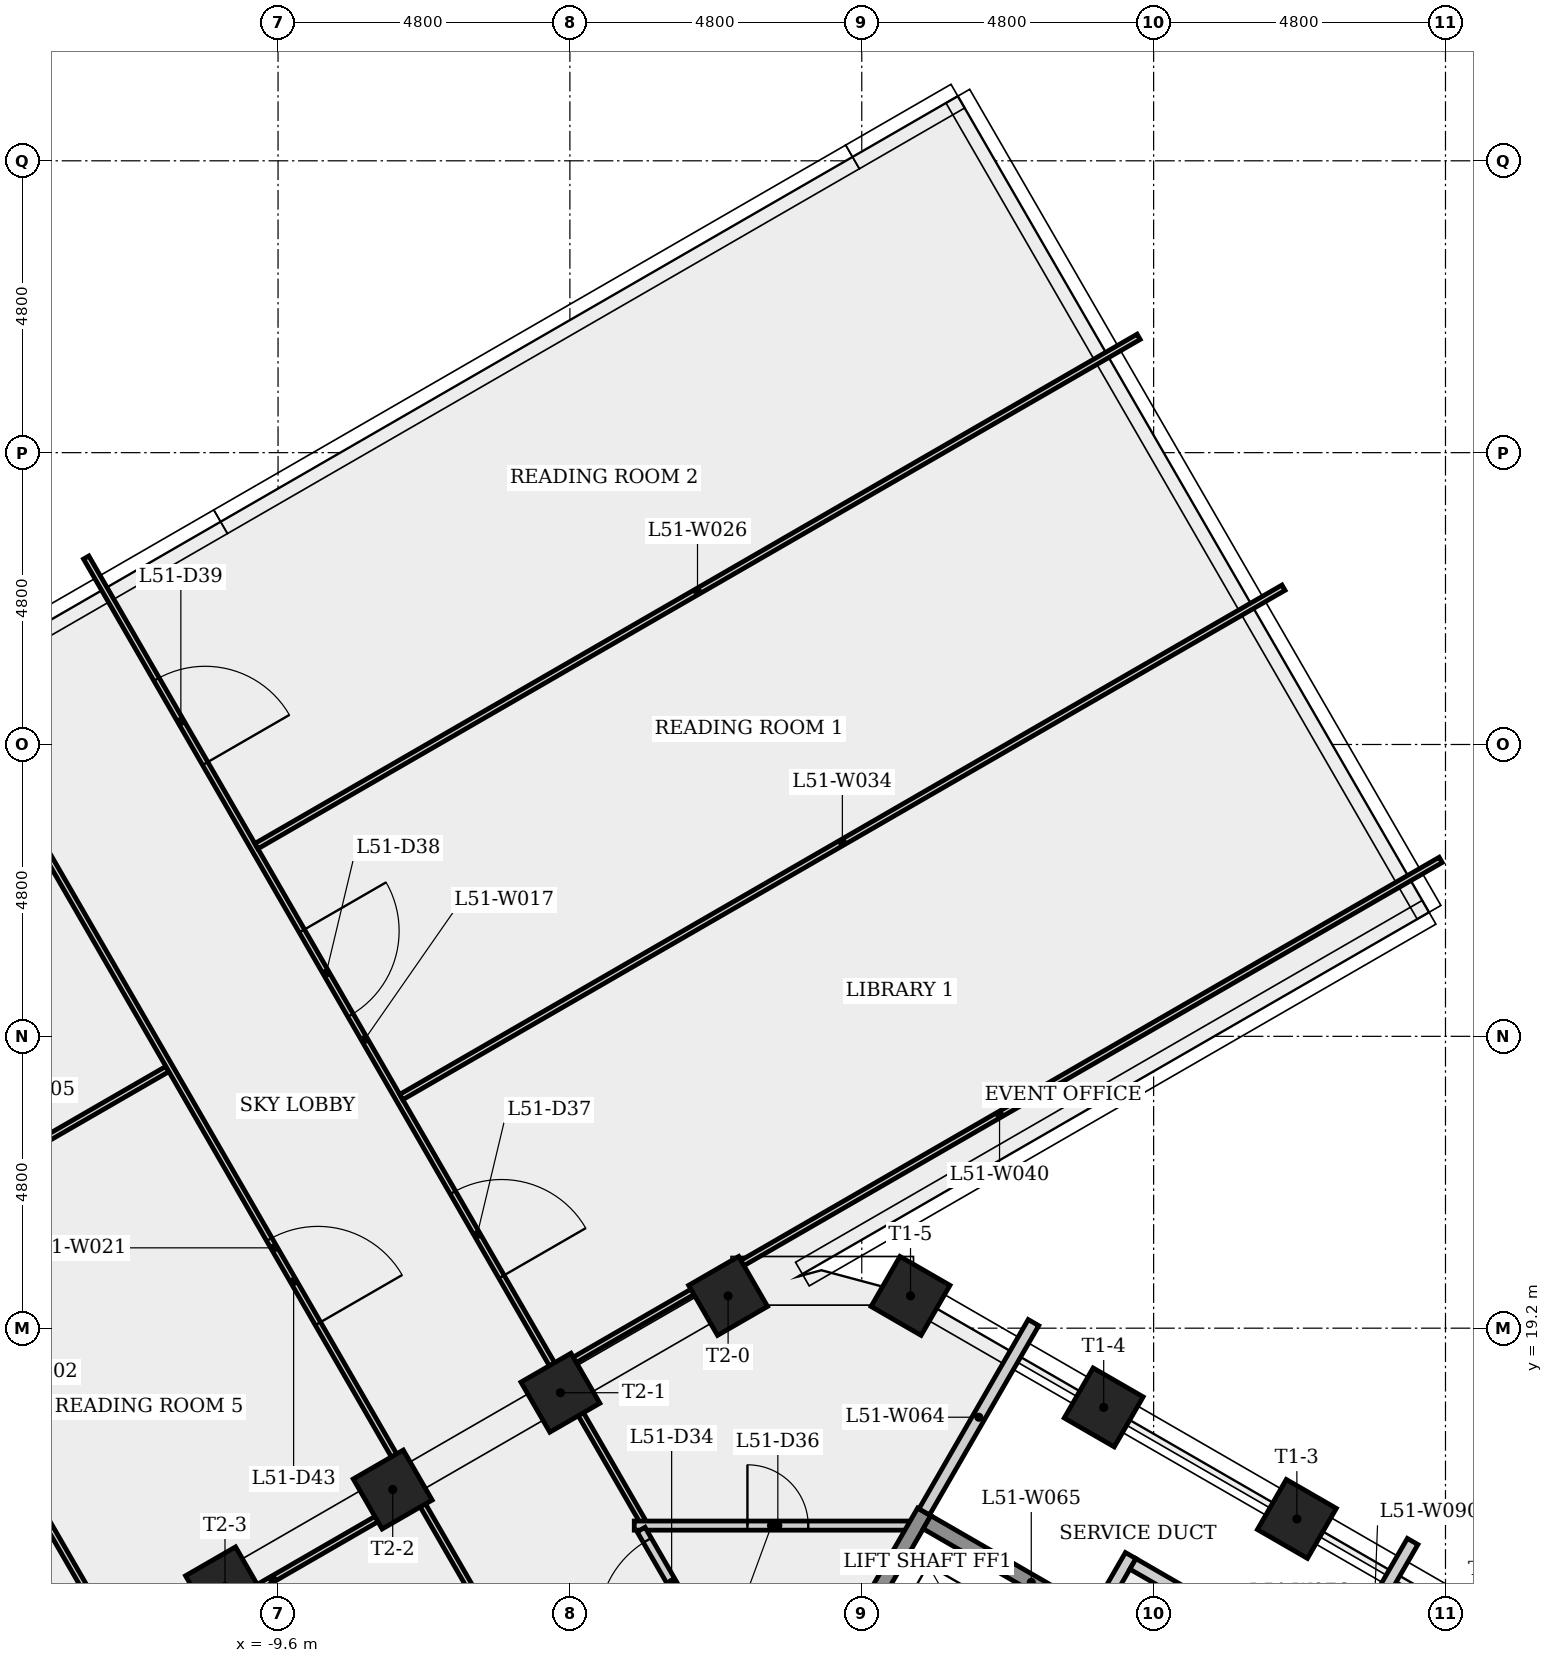
"""IFC4 building model, lengths in metres.
Left out: names, types, materials, properties, quantities, classifications, styles, units other than length and angle.
Written with IfcOpenShell. Run it as: python <this file> out.ifc"""

import sys

from ifc_helpers import new_model, si_unit, direction, frame, frame_2d, origin, origin_2d, place, context, subcontext, project, spatial, rectangle, extrude, element, fill, save


model = new_model("IFC4")
c1 = context("Model", 3, precision=1e-05, world=origin(), true_north=direction((0.0, 1.0)))
c2 = subcontext(c1, "Body", "Model", "MODEL_VIEW")
j1 = project(units=[si_unit("LENGTHUNIT", "METRE"), si_unit("PLANEANGLEUNIT", "RADIAN")], contexts=[c1])
p1 = place(None, origin())
s1 = spatial("IfcSite", under=j1, at=p1, CompositionType="ELEMENT")
p2 = place(p1, origin())
s2 = spatial("IfcBuilding", under=s1, at=p2, CompositionType="ELEMENT")
p3 = place(p2, frame((0.0, 0.0, 190.7)))
s3 = spatial("IfcBuildingStorey", under=s2, at=p3, CompositionType="ELEMENT", Elevation=190.7)
for number, where, z_axis, x_axis in (
    (1, (7.156, 16.062, 0.0), (0.0, 0.0, 1.0), (0.5, 0.866, 0.0)),
    (2, (3.979, 17.897, 0.0), (0.0, 0.0, 1.0), (0.5, 0.866, 0.0)),
    (3, (0.802, 19.731, 0.0), (0.0, 0.0, 1.0), (0.5, 0.866, 0.0)),
    (4, (-2.198, 19.731, 0.0), (0.0, 0.0, 1.0), (-0.5, 0.866, 0.0)),
    (5, (-4.956, 18.138, 0.0), (0.0, 0.0, 1.0), (-0.5, 0.866, 0.0)),
    (6, (-7.714, 16.546, 0.0), (0.0, 0.0, 1.0), (-0.5, 0.866, 0.0)),
    (7, (-10.472, 14.954, 0.0), (0.0, 0.0, 1.0), (-0.5, 0.866, 0.0)),
):
    element("IfcColumn", number, at=place(p3, frame(where, z_axis=z_axis, x_axis=x_axis)), inside=s3, PredefinedType="COLUMN", context=c2, shape_type="SweptSolid", body=[
        extrude(rectangle(XDim=0.95, YDim=0.95, at=origin_2d()), origin(), (0.0, 0.0, 1.0), 4.0),
    ])
p4 = place(p3, frame((-20.11, 27.629, 0.0), z_axis=(0.0, 0.0, 1.0), x_axis=(0.499998569178, -0.866026229868, 0.0)))
e8 = element("IfcWall", 8, at=p4, inside=s3, PredefinedType="PARTITIONING", context=c2, shape_type="SweptSolid", body=[
    extrude(rectangle(XDim=22.757, YDim=0.1, at=frame_2d((11.379, 0.0))), origin(), (0.0, 0.0, 1.0), 3.6),
])
p5 = place(p4, frame((18.635, 0.0, 0.0)))
e9 = element("IfcOpeningElement", 9, at=p5, cuts=e8, PredefinedType="OPENING", context=c2, shape_type="SweptSolid", body=[
    extrude(rectangle(XDim=1.6, YDim=2.1, at=frame_2d((0.8, 1.05))), frame((0.0, 0.06, 0.0), z_axis=(0.0, -1.0, 0.0), x_axis=(1.0, 0.0, 0.0)), (0.0, 0.0, 1.0), 0.12),
])
p6 = place(p4, frame((3.535, 0.0, 0.0)))
e10 = element("IfcOpeningElement", 10, at=p6, cuts=e8, PredefinedType="OPENING", context=c2, shape_type="SweptSolid", body=[
    extrude(rectangle(XDim=1.6, YDim=2.1, at=frame_2d((0.8, 1.05))), frame((0.0, 0.06, 0.0), z_axis=(0.0, -1.0, 0.0), x_axis=(1.0, 0.0, 0.0)), (0.0, 0.0, 1.0), 0.12),
])
p7 = place(p3, frame((-22.708, 26.129, 0.0), z_axis=(0.0, 0.0, 1.0), x_axis=(0.500000613642, -0.866025049498, 0.0)))
e11 = element("IfcWall", 11, at=p7, inside=s3, PredefinedType="PARTITIONING", context=c2, shape_type="SweptSolid", body=[
    extrude(rectangle(XDim=19.298, YDim=0.1, at=frame_2d((9.649, 0.0))), origin(), (0.0, 0.0, 1.0), 3.6),
])
p8 = place(p7, frame((14.008, 0.0, 0.0)))
e12 = element("IfcOpeningElement", 12, at=p8, cuts=e11, PredefinedType="OPENING", context=c2, shape_type="SweptSolid", body=[
    extrude(rectangle(XDim=1.6, YDim=2.1, at=frame_2d((0.8, 1.05))), frame((0.0, 0.06, 0.0), z_axis=(0.0, -1.0, 0.0), x_axis=(1.0, 0.0, 0.0)), (0.0, 0.0, 1.0), 0.12),
])
p9 = place(p7, frame((4.902, 0.0, 0.0)))
e13 = element("IfcOpeningElement", 13, at=p9, cuts=e11, PredefinedType="OPENING", context=c2, shape_type="SweptSolid", body=[
    extrude(rectangle(XDim=1.6, YDim=2.1, at=frame_2d((0.8, 1.05))), frame((0.0, 0.06, 0.0), z_axis=(0.0, -1.0, 0.0), x_axis=(1.0, 0.0, 0.0)), (0.0, 0.0, 1.0), 0.12),
])
p10 = place(p3, frame((-16.09, 20.766, 0.0), z_axis=(0.0, 0.0, 1.0), x_axis=(0.866008413041, 0.500029427677, 0.0)))
e14 = element("IfcWall", 14, at=p10, inside=s3, PredefinedType="PARTITIONING", context=c2, shape_type="SweptSolid", body=[
    extrude(rectangle(XDim=5.393, YDim=0.1, at=frame_2d((2.696, 0.0))), origin(), (0.0, 0.0, 1.0), 3.6),
])
p11 = place(p3, frame((-12.755, 31.875, 0.0), z_axis=(0.0, 0.0, 1.0), x_axis=(0.49999367972, -0.866029052769, 0.0)))
e15 = element("IfcWall", 15, at=p11, inside=s3, PredefinedType="PARTITIONING", context=c2, shape_type="SweptSolid", body=[
    extrude(rectangle(XDim=18.311, YDim=0.1, at=frame_2d((9.155, 0.0))), origin(), (0.0, 0.0, 1.0), 3.6),
])
p12 = place(p11, frame((12.06, 0.0, 0.0)))
e16 = element("IfcOpeningElement", 16, at=p12, cuts=e15, PredefinedType="OPENING", context=c2, shape_type="SweptSolid", body=[
    extrude(rectangle(XDim=1.6, YDim=2.1, at=frame_2d((0.8, 1.05))), frame((0.0, 0.06, 0.0), z_axis=(0.0, -1.0, 0.0), x_axis=(1.0, 0.0, 0.0)), (0.0, 0.0, 1.0), 0.12),
])
p13 = place(p11, frame((7.093, 0.0, 0.0)))
e17 = element("IfcOpeningElement", 17, at=p13, cuts=e15, PredefinedType="OPENING", context=c2, shape_type="SweptSolid", body=[
    extrude(rectangle(XDim=1.6, YDim=2.1, at=frame_2d((0.8, 1.05))), frame((0.0, 0.06, 0.0), z_axis=(0.0, -1.0, 0.0), x_axis=(1.0, 0.0, 0.0)), (0.0, 0.0, 1.0), 0.12),
])
p14 = place(p11, frame((2.313, 0.0, 0.0)))
e18 = element("IfcOpeningElement", 18, at=p14, cuts=e15, PredefinedType="OPENING", context=c2, shape_type="SweptSolid", body=[
    extrude(rectangle(XDim=1.6, YDim=2.1, at=frame_2d((0.8, 1.05))), frame((0.0, 0.06, 0.0), z_axis=(0.0, -1.0, 0.0), x_axis=(1.0, 0.0, 0.0)), (0.0, 0.0, 1.0), 0.12),
])
p15 = place(p3, frame((-12.025, 13.726, 0.0), z_axis=(0.0, 0.0, 1.0), x_axis=(0.866039334336, 0.4999758708, 0.0)))
e19 = element("IfcWall", 19, at=p15, inside=s3, PredefinedType="PARTITIONING", context=c2, shape_type="SweptSolid", body=[
    extrude(rectangle(XDim=5.393, YDim=0.1, at=frame_2d((2.696, 0.0))), origin(), (0.0, 0.0, 1.0), 3.6),
])
p16 = place(p3, frame((-15.353, 30.375, 0.0), z_axis=(0.0, 0.0, 1.0), x_axis=(0.499998569178, -0.866026229868, 0.0)))
e20 = element("IfcWall", 20, at=p16, inside=s3, PredefinedType="PARTITIONING", context=c2, shape_type="SweptSolid", body=[
    extrude(rectangle(XDim=22.757, YDim=0.1, at=frame_2d((11.379, 0.0))), origin(), (0.0, 0.0, 1.0), 3.6),
])
p17 = place(p16, frame((11.219, 0.0, 0.0)))
e21 = element("IfcOpeningElement", 21, at=p17, cuts=e20, PredefinedType="OPENING", context=c2, shape_type="SweptSolid", body=[
    extrude(rectangle(XDim=1.6, YDim=2.1, at=frame_2d((0.8, 1.05))), frame((0.0, 0.06, 0.0), z_axis=(0.0, -1.0, 0.0), x_axis=(1.0, 0.0, 0.0)), (0.0, 0.0, 1.0), 0.12),
])
for number, where, z_axis, x_axis in (
    (22, (-9.956, 27.128, 0.0), (0.0, 0.0, 1.0), (0.866, 0.5, 0.0)),
    (23, (-7.574, 23.002, 0.0), (0.0, 0.0, 1.0), (0.866, 0.5, 0.0)),
    (24, (-4.989, 18.524, 0.0), (0.0, 0.0, 1.0), (0.866, 0.5, 0.0)),
):
    element("IfcWall", number, at=place(p3, frame(where, z_axis=z_axis, x_axis=x_axis)), inside=s3, PredefinedType="PARTITIONING", context=c2, shape_type="SweptSolid", body=[
        extrude(rectangle(XDim=16.754, YDim=0.1, at=frame_2d((8.377, 0.0))), origin(), (0.0, 0.0, 1.0), 3.6),
    ])
p18 = place(p3, frame((-3.741, 15.953, 0.0), z_axis=(0.0, 0.0, 1.0), x_axis=(1.0, 0.0, 0.0)))
e25 = element("IfcWall", 25, at=p18, inside=s3, PredefinedType="PARTITIONING", context=c2, shape_type="SweptSolid", body=[
    extrude(rectangle(XDim=4.513, YDim=0.15, at=frame_2d((2.256, 0.0))), origin(), (0.0, 0.0, 1.0), 3.6),
])
p19 = place(p18, frame((1.861, 0.0, 0.0)))
e26 = element("IfcOpeningElement", 26, at=p19, cuts=e25, PredefinedType="OPENING", context=c2, shape_type="SweptSolid", body=[
    extrude(rectangle(XDim=1.0, YDim=2.1, at=frame_2d((0.5, 1.05))), frame((0.0, 0.085, 0.0), z_axis=(0.0, -1.0, 0.0), x_axis=(1.0, 0.0, 0.0)), (0.0, 0.0, 1.0), 0.17),
])
p20 = place(p3, frame((-2.324, 13.628, 0.0), z_axis=(0.0, 0.0, 1.0), x_axis=(-0.499973559465, 0.866040668696, 0.0)))
e27 = element("IfcWall", 27, at=p20, inside=s3, PredefinedType="PARTITIONING", context=c2, shape_type="SweptSolid", body=[
    extrude(rectangle(XDim=2.609, YDim=0.15, at=frame_2d((1.305, 0.0))), origin(), (0.0, 0.0, 1.0), 3.6),
])
p21 = place(p20, frame((0.805, 0.0, 0.0)))
e28 = element("IfcOpeningElement", 28, at=p21, cuts=e27, PredefinedType="OPENING", context=c2, shape_type="SweptSolid", body=[
    extrude(rectangle(XDim=1.6, YDim=2.1, at=frame_2d((0.8, 1.05))), frame((0.0, 0.085, 0.0), z_axis=(0.0, -1.0, 0.0), x_axis=(1.0, 0.0, 0.0)), (0.0, 0.0, 1.0), 0.17),
])
p22 = place(p3, frame((-0.448, 13.624, 0.0), z_axis=(0.0, 0.0, 1.0), x_axis=(0.500037662692, 0.866003658127, 0.0)))
e29 = element("IfcWall", 29, at=p22, inside=s3, PredefinedType="SHEAR", context=c2, shape_type="SweptSolid", body=[
    extrude(rectangle(XDim=2.95, YDim=0.25, at=frame_2d((1.475, 0.0))), origin(), (0.0, 0.0, 1.0), 3.6),
])
p23 = place(p3, frame((1.027, 16.179, 0.0), z_axis=(0.0, 0.0, 1.0), x_axis=(0.499988999718, 0.866031754707, 0.0)))
e30 = element("IfcWall", 30, at=p23, inside=s3, PredefinedType="PLUMBINGWALL", context=c2, shape_type="SweptSolid", body=[
    extrude(rectangle(XDim=3.594, YDim=0.2, at=frame_2d((1.797, 0.0))), origin(), (0.0, 0.0, 1.0), 3.6),
])
p24 = place(p3, frame((1.073, 16.008, 0.0), z_axis=(0.0, 0.0, 1.0), x_axis=(0.866040211805, -0.499974350878, 0.0)))
e31 = element("IfcWall", 31, at=p24, inside=s3, PredefinedType="SHEAR", context=c2, shape_type="SweptSolid", body=[
    extrude(rectangle(XDim=3.3, YDim=0.25, at=frame_2d((1.65, 0.0))), origin(), (0.0, 0.0, 1.0), 3.6),
])
p25 = place(p3, frame((3.885, 14.529, 0.0), z_axis=(0.0, 0.0, 1.0), x_axis=(0.499997628298, 0.866026773083, 0.0)))
e32 = element("IfcWall", 32, at=p25, inside=s3, PredefinedType="PLUMBINGWALL", context=c2, shape_type="SweptSolid", body=[
    extrude(rectangle(XDim=1.075, YDim=0.2, at=frame_2d((0.538, 0.0))), origin(), (0.0, 0.0, 1.0), 3.6),
])
p26 = place(p3, frame((4.459, 15.323, 0.0), z_axis=(0.0, 0.0, 1.0), x_axis=(0.866016039709, -0.500016218704, 0.0)))
e33 = element("IfcWall", 33, at=p26, inside=s3, PredefinedType="PLUMBINGWALL", context=c2, shape_type="SweptSolid", body=[
    extrude(rectangle(XDim=4.7, YDim=0.2, at=frame_2d((2.35, 0.0))), origin(), (0.0, 0.0, 1.0), 3.6),
])
p27 = place(p3, frame((7.8, 13.51, 0.0), z_axis=(0.0, 0.0, 1.0), x_axis=(0.499985316883, 0.86603388092, 0.0)))
e34 = element("IfcWall", 34, at=p27, inside=s3, PredefinedType="PLUMBINGWALL", context=c2, shape_type="SweptSolid", body=[
    extrude(rectangle(XDim=2.519, YDim=0.2, at=frame_2d((1.26, 0.0))), origin(), (0.0, 0.0, 1.0), 3.6),
])
p28 = place(p21, origin())
e35 = element("IfcDoor", 35, at=p28, inside=s3, OperationType="SINGLE_SWING_LEFT", PredefinedType="DOOR", context=c2, shape_type="SweptSolid", body=[
    extrude(rectangle(XDim=1.6, YDim=2.1, at=frame_2d((0.8, 1.05))), frame((0.0, 0.025, 0.0), z_axis=(0.0, -1.0, 0.0), x_axis=(1.0, 0.0, 0.0)), (0.0, 0.0, 1.0), 0.05),
])
fill(e28, e35)
p29 = place(p19, origin())
e36 = element("IfcDoor", 36, at=p29, inside=s3, OperationType="SINGLE_SWING_LEFT", PredefinedType="DOOR", context=c2, shape_type="SweptSolid", body=[
    extrude(rectangle(XDim=1.0, YDim=2.1, at=frame_2d((0.5, 1.05))), frame((0.0, 0.025, 0.0), z_axis=(0.0, -1.0, 0.0), x_axis=(1.0, 0.0, 0.0)), (0.0, 0.0, 1.0), 0.05),
])
fill(e26, e36)
p30 = place(p12, origin())
e37 = element("IfcDoor", 37, at=p30, inside=s3, OperationType="SINGLE_SWING_RIGHT", PredefinedType="DOOR", context=c2, shape_type="SweptSolid", body=[
    extrude(rectangle(XDim=1.6, YDim=2.1, at=frame_2d((0.8, 1.05))), frame((0.0, 0.025, 0.0), z_axis=(0.0, -1.0, 0.0), x_axis=(1.0, 0.0, 0.0)), (0.0, 0.0, 1.0), 0.05),
])
fill(e16, e37)
p31 = place(p13, origin())
e38 = element("IfcDoor", 38, at=p31, inside=s3, OperationType="SINGLE_SWING_LEFT", PredefinedType="DOOR", context=c2, shape_type="SweptSolid", body=[
    extrude(rectangle(XDim=1.6, YDim=2.1, at=frame_2d((0.8, 1.05))), frame((0.0, 0.025, 0.0), z_axis=(0.0, -1.0, 0.0), x_axis=(1.0, 0.0, 0.0)), (0.0, 0.0, 1.0), 0.05),
])
fill(e17, e38)
p32 = place(p14, origin())
e39 = element("IfcDoor", 39, at=p32, inside=s3, OperationType="SINGLE_SWING_RIGHT", PredefinedType="DOOR", context=c2, shape_type="SweptSolid", body=[
    extrude(rectangle(XDim=1.6, YDim=2.1, at=frame_2d((0.8, 1.05))), frame((0.0, 0.025, 0.0), z_axis=(0.0, -1.0, 0.0), x_axis=(1.0, 0.0, 0.0)), (0.0, 0.0, 1.0), 0.05),
])
fill(e18, e39)
p33 = place(p17, origin())
e40 = element("IfcDoor", 40, at=p33, inside=s3, OperationType="SINGLE_SWING_RIGHT", PredefinedType="DOOR", context=c2, shape_type="SweptSolid", body=[
    extrude(rectangle(XDim=1.6, YDim=2.1, at=frame_2d((0.8, 1.05))), frame((0.0, 0.025, 0.0), z_axis=(0.0, -1.0, 0.0), x_axis=(1.0, 0.0, 0.0)), (0.0, 0.0, 1.0), 0.05),
])
fill(e21, e40)
save(model, sys.argv[1])
